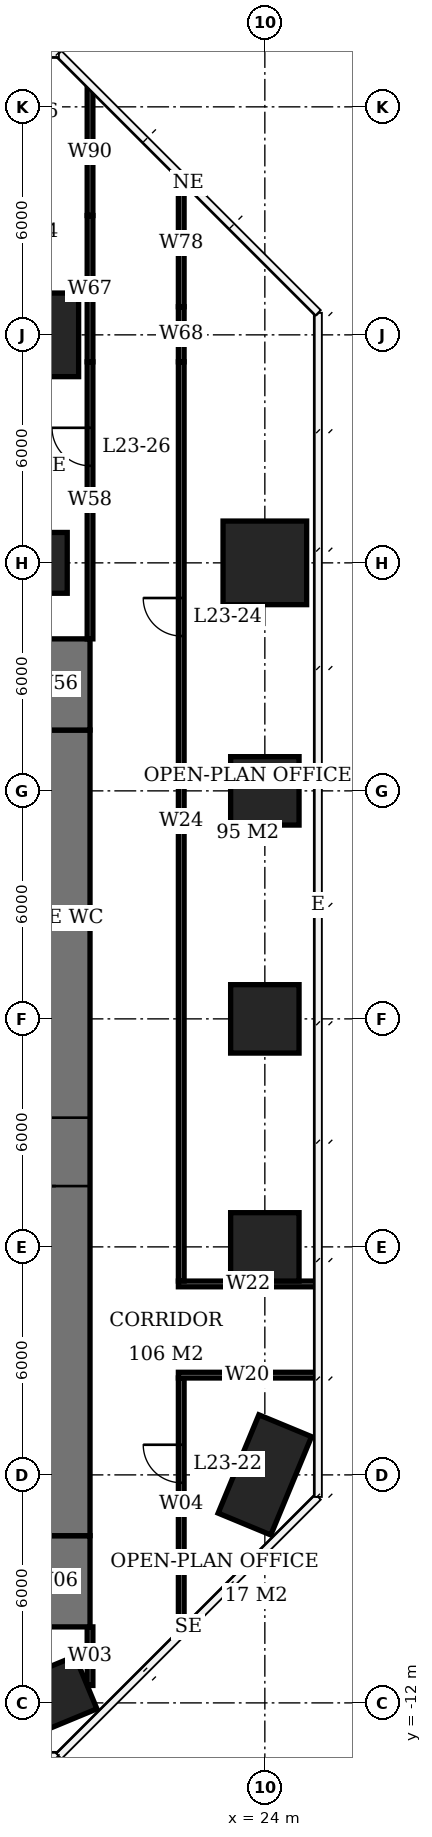
"""IFC4 building model, lengths in metres.
Left out: names, types, materials, properties, quantities, classifications, styles, units other than length and angle.
Written with IfcOpenShell. Run it as: python <this file> out.ifc"""

import sys

from ifc_helpers import new_model, si_unit, direction, frame, frame_2d, origin, origin_2d, place, context, subcontext, project, spatial, rectangle, extrude, element, fill, save


model = new_model("IFC4")
c1 = context("Model", 3, precision=1e-05, world=origin(), true_north=direction((0.0, 1.0)))
c2 = subcontext(c1, "Body", "Model", "MODEL_VIEW")
j1 = project(units=[si_unit("LENGTHUNIT", "METRE"), si_unit("PLANEANGLEUNIT", "RADIAN")], contexts=[c1])
p1 = place(None, origin())
s1 = spatial("IfcSite", under=j1, at=p1, CompositionType="ELEMENT")
p2 = place(p1, origin())
s2 = spatial("IfcBuilding", under=s1, at=p2, CompositionType="ELEMENT")
p3 = place(p2, frame((0.0, 0.0, 97.7)))
s3 = spatial("IfcBuildingStorey", under=s2, at=p3, CompositionType="ELEMENT", Elevation=97.7)
p4 = place(p3, frame((18.0, -12.0, 0.0), z_axis=(0.0, 0.0, 1.0), x_axis=(-0.923879532511, -0.382683432365, 0.0)))
e1 = element("IfcColumn", 1, at=p4, inside=s3, PredefinedType="COLUMN", context=c2, shape_type="SweptSolid", body=[
    extrude(rectangle(XDim=2.8, YDim=1.5, at=origin_2d()), origin(), (0.0, 0.0, 1.0), 3.9),
])
p5 = place(p3, frame((18.0, 18.0, 0.0), z_axis=(0.0, 0.0, 1.0), x_axis=(1.0, 0.0, 0.0)))
e2 = element("IfcColumn", 2, at=p5, inside=s3, PredefinedType="COLUMN", context=c2, shape_type="SweptSolid", body=[
    extrude(rectangle(XDim=1.6, YDim=1.6, at=origin_2d()), origin(), (0.0, 0.0, 1.0), 3.9),
])
p6 = place(p3, frame((18.0, 24.0, 0.0), z_axis=(0.0, 0.0, 1.0), x_axis=(1.0, 0.0, 0.0)))
e3 = element("IfcColumn", 3, at=p6, inside=s3, PredefinedType="COLUMN", context=c2, shape_type="SweptSolid", body=[
    extrude(rectangle(XDim=2.2, YDim=2.2, at=origin_2d()), origin(), (0.0, 0.0, 1.0), 3.9),
])
p7 = place(p3, frame((24.0, -6.0, 0.0), z_axis=(0.0, 0.0, 1.0), x_axis=(-0.382683432365, -0.923879532511, 0.0)))
e4 = element("IfcColumn", 4, at=p7, inside=s3, PredefinedType="COLUMN", context=c2, shape_type="SweptSolid", body=[
    extrude(rectangle(XDim=2.8, YDim=1.5, at=origin_2d()), origin(), (0.0, 0.0, 1.0), 3.9),
])
for number, where, z_axis, x_axis in (
    (5, (24.0, 0.0, 0.0), (0.0, 0.0, 1.0), (1.0, 0.0, 0.0)),
    (6, (24.0, 6.0, 0.0), (0.0, 0.0, 1.0), (1.0, 0.0, 0.0)),
    (7, (24.0, 12.0, 0.0), (0.0, 0.0, 1.0), (1.0, 0.0, 0.0)),
):
    element("IfcColumn", number, at=place(p3, frame(where, z_axis=z_axis, x_axis=x_axis)), inside=s3, PredefinedType="COLUMN", context=c2, shape_type="SweptSolid", body=[
        extrude(rectangle(XDim=1.8, YDim=1.8, at=origin_2d()), origin(), (0.0, 0.0, 1.0), 3.9),
    ])
p8 = place(p3, frame((24.0, 18.0, 0.0), z_axis=(0.0, 0.0, 1.0), x_axis=(1.0, 0.0, 0.0)))
e8 = element("IfcColumn", 8, at=p8, inside=s3, PredefinedType="COLUMN", context=c2, shape_type="SweptSolid", body=[
    extrude(rectangle(XDim=2.2, YDim=2.2, at=origin_2d()), origin(), (0.0, 0.0, 1.0), 3.9),
])
p9 = place(p3, frame((18.5, -7.6, 0.0), z_axis=(0.0, 0.0, 1.0), x_axis=(0.0, 1.0, 0.0)))
e9 = element("IfcWall", 9, at=p9, inside=s3, PredefinedType="SHEAR", context=c2, shape_type="SweptSolid", body=[
    extrude(rectangle(XDim=21.2, YDim=1.8, at=frame_2d((10.6, 0.0))), origin(), (0.0, 0.0, 1.0), 3.9),
])
p10 = place(p9, frame((9.2, 0.0, 0.0)))
e10 = element("IfcOpeningElement", 10, at=p10, cuts=e9, PredefinedType="OPENING", context=c2, shape_type="SweptSolid", body=[
    extrude(rectangle(XDim=1.8, YDim=2.4, at=frame_2d((0.9, 1.2))), frame((0.0, 0.91, 0.0), z_axis=(0.0, -1.0, 0.0), x_axis=(1.0, 0.0, 0.0)), (0.0, 0.0, 1.0), 1.82),
])
for number, where, z_axis, x_axis in (
    (11, (18.5, -10.0, 0.0), (0.0, 0.0, 1.0), (0.0, 1.0, 0.0)),
    (12, (18.5, 13.6, 0.0), (0.0, 0.0, 1.0), (0.0, 1.0, 0.0)),
):
    element("IfcWall", number, at=place(p3, frame(where, z_axis=z_axis, x_axis=x_axis)), inside=s3, PredefinedType="SHEAR", context=c2, shape_type="SweptSolid", body=[
        extrude(rectangle(XDim=2.4, YDim=1.8, at=frame_2d((1.2, 0.0))), origin(), (0.0, 0.0, 1.0), 3.9),
    ])
p11 = place(p3, frame((19.4, -11.541, 0.0), z_axis=(0.0, 0.0, 1.0), x_axis=(0.0, 1.0, 0.0)))
e13 = element("IfcWall", 13, at=p11, inside=s3, PredefinedType="PARTITIONING", context=c2, shape_type="SweptSolid", body=[
    extrude(rectangle(XDim=1.541, YDim=0.15, at=frame_2d((0.77, 0.0))), origin(), (0.0, 0.0, 1.0), 3.65),
])
p12 = place(p3, frame((19.4, 16.0, 0.0), z_axis=(0.0, 0.0, 1.0), x_axis=(0.0, 1.0, 0.0)))
e14 = element("IfcWall", 14, at=p12, inside=s3, PredefinedType="PARTITIONING", context=c2, shape_type="SweptSolid", body=[
    extrude(rectangle(XDim=7.29, YDim=0.15, at=frame_2d((3.645, 0.0))), origin(), (0.0, 0.0, 1.0), 3.65),
])
p13 = place(p12, frame((4.554, 0.0, 0.0)))
e15 = element("IfcOpeningElement", 15, at=p13, cuts=e14, PredefinedType="OPENING", context=c2, shape_type="SweptSolid", body=[
    extrude(rectangle(XDim=1.0, YDim=2.1, at=frame_2d((0.5, 1.05))), frame((0.0, 0.085, 0.0), z_axis=(0.0, -1.0, 0.0), x_axis=(1.0, 0.0, 0.0)), (0.0, 0.0, 1.0), 0.17),
])
p14 = place(p3, frame((19.4, 23.29, 0.0), z_axis=(0.0, 0.0, 1.0), x_axis=(0.0, 1.0, 0.0)))
e16 = element("IfcWall", 16, at=p14, inside=s3, PredefinedType="PARTITIONING", context=c2, shape_type="SweptSolid", body=[
    extrude(rectangle(XDim=3.85, YDim=0.15, at=frame_2d((1.925, 0.0))), origin(), (0.0, 0.0, 1.0), 2.65),
])
p15 = place(p3, frame((19.4, 27.14, 0.0), z_axis=(0.0, 0.0, 1.0), x_axis=(0.0, 1.0, 0.0)))
e17 = element("IfcWall", 17, at=p15, inside=s3, PredefinedType="PARTITIONING", context=c2, shape_type="SweptSolid", body=[
    extrude(rectangle(XDim=3.349, YDim=0.15, at=frame_2d((1.675, 0.0))), origin(), (0.0, 0.0, 1.0), 3.65),
])
p16 = place(p3, frame((21.8, -10.089, 0.0), z_axis=(0.0, 0.0, 1.0), x_axis=(0.0, 1.0, 0.0)))
e18 = element("IfcWall", 18, at=p16, inside=s3, PredefinedType="PARTITIONING", context=c2, shape_type="SweptSolid", body=[
    extrude(rectangle(XDim=6.639, YDim=0.15, at=frame_2d((3.32, 0.0))), origin(), (0.0, 0.0, 1.0), 3.65),
])
p17 = place(p16, frame((3.882, 0.0, 0.0)))
e19 = element("IfcOpeningElement", 19, at=p17, cuts=e18, PredefinedType="OPENING", context=c2, shape_type="SweptSolid", body=[
    extrude(rectangle(XDim=1.0, YDim=2.1, at=frame_2d((0.5, 1.05))), frame((0.0, 0.085, 0.0), z_axis=(0.0, -1.0, 0.0), x_axis=(1.0, 0.0, 0.0)), (0.0, 0.0, 1.0), 0.17),
])
p18 = place(p3, frame((21.725, -3.375, 0.0), z_axis=(0.0, 0.0, 1.0), x_axis=(1.0, 0.0, 0.0)))
e20 = element("IfcWall", 20, at=p18, inside=s3, PredefinedType="PARTITIONING", context=c2, shape_type="SweptSolid", body=[
    extrude(rectangle(XDim=3.625, YDim=0.15, at=frame_2d((1.812, 0.0))), origin(), (0.0, 0.0, 1.0), 3.65),
])
p19 = place(p3, frame((21.8, -0.9, 0.0), z_axis=(0.0, 0.0, 1.0), x_axis=(0.0, 1.0, 0.0)))
e21 = element("IfcWall", 21, at=p19, inside=s3, PredefinedType="PARTITIONING", context=c2, shape_type="SweptSolid", body=[
    extrude(rectangle(XDim=24.19, YDim=0.15, at=frame_2d((12.095, 0.0))), origin(), (0.0, 0.0, 1.0), 3.65),
])
p20 = place(p19, frame((16.975, 0.0, 0.0)))
e22 = element("IfcOpeningElement", 22, at=p20, cuts=e21, PredefinedType="OPENING", context=c2, shape_type="SweptSolid", body=[
    extrude(rectangle(XDim=1.0, YDim=2.1, at=frame_2d((0.5, 1.05))), frame((0.0, 0.085, 0.0), z_axis=(0.0, -1.0, 0.0), x_axis=(1.0, 0.0, 0.0)), (0.0, 0.0, 1.0), 0.17),
])
p21 = place(p3, frame((21.8, 23.29, 0.0), z_axis=(0.0, 0.0, 1.0), x_axis=(0.0, 1.0, 0.0)))
e23 = element("IfcWall", 23, at=p21, inside=s3, PredefinedType="PARTITIONING", context=c2, shape_type="SweptSolid", body=[
    extrude(rectangle(XDim=1.45, YDim=0.15, at=frame_2d((0.725, 0.0))), origin(), (0.0, 0.0, 1.0), 2.65),
])
p22 = place(p3, frame((21.8, 24.74, 0.0), z_axis=(0.0, 0.0, 1.0), x_axis=(0.0, 1.0, 0.0)))
e24 = element("IfcWall", 24, at=p22, inside=s3, PredefinedType="PARTITIONING", context=c2, shape_type="SweptSolid", body=[
    extrude(rectangle(XDim=3.349, YDim=0.15, at=frame_2d((1.675, 0.0))), origin(), (0.0, 0.0, 1.0), 3.65),
])
p23 = place(p3, frame((21.725, -0.975, 0.0), z_axis=(0.0, 0.0, 1.0), x_axis=(1.0, 0.0, 0.0)))
e25 = element("IfcWall", 25, at=p23, inside=s3, PredefinedType="PARTITIONING", context=c2, shape_type="SweptSolid", body=[
    extrude(rectangle(XDim=3.675, YDim=0.15, at=frame_2d((1.837, 0.0))), origin(), (0.0, 0.0, 1.0), 3.65),
])
p24 = place(p10, origin())
e26 = element("IfcDoor", 26, at=p24, inside=s3, OperationType="DOUBLE_DOOR_SINGLE_SWING", PredefinedType="DOOR", context=c2, shape_type="SweptSolid", body=[
    extrude(rectangle(XDim=1.8, YDim=2.4, at=frame_2d((0.9, 1.2))), frame((0.0, 0.025, 0.0), z_axis=(0.0, -1.0, 0.0), x_axis=(1.0, 0.0, 0.0)), (0.0, 0.0, 1.0), 0.05),
])
fill(e10, e26)
p25 = place(p17, origin())
e27 = element("IfcDoor", 27, at=p25, inside=s3, OperationType="SINGLE_SWING_RIGHT", PredefinedType="DOOR", context=c2, shape_type="SweptSolid", body=[
    extrude(rectangle(XDim=1.0, YDim=2.1, at=frame_2d((0.5, 1.05))), frame((0.0, 0.025, 0.0), z_axis=(0.0, -1.0, 0.0), x_axis=(1.0, 0.0, 0.0)), (0.0, 0.0, 1.0), 0.05),
])
fill(e19, e27)
p26 = place(p20, origin())
e28 = element("IfcDoor", 28, at=p26, inside=s3, OperationType="SINGLE_SWING_RIGHT", PredefinedType="DOOR", context=c2, shape_type="SweptSolid", body=[
    extrude(rectangle(XDim=1.0, YDim=2.1, at=frame_2d((0.5, 1.05))), frame((0.0, 0.025, 0.0), z_axis=(0.0, -1.0, 0.0), x_axis=(1.0, 0.0, 0.0)), (0.0, 0.0, 1.0), 0.05),
])
fill(e22, e28)
p27 = place(p13, origin())
e29 = element("IfcDoor", 29, at=p27, inside=s3, OperationType="SINGLE_SWING_RIGHT", PredefinedType="DOOR", context=c2, shape_type="SweptSolid", body=[
    extrude(rectangle(XDim=1.0, YDim=2.1, at=frame_2d((0.5, 1.05))), frame((0.0, 0.025, 0.0), z_axis=(0.0, -1.0, 0.0), x_axis=(1.0, 0.0, 0.0)), (0.0, 0.0, 1.0), 0.05),
])
fill(e15, e29)
save(model, sys.argv[1])
